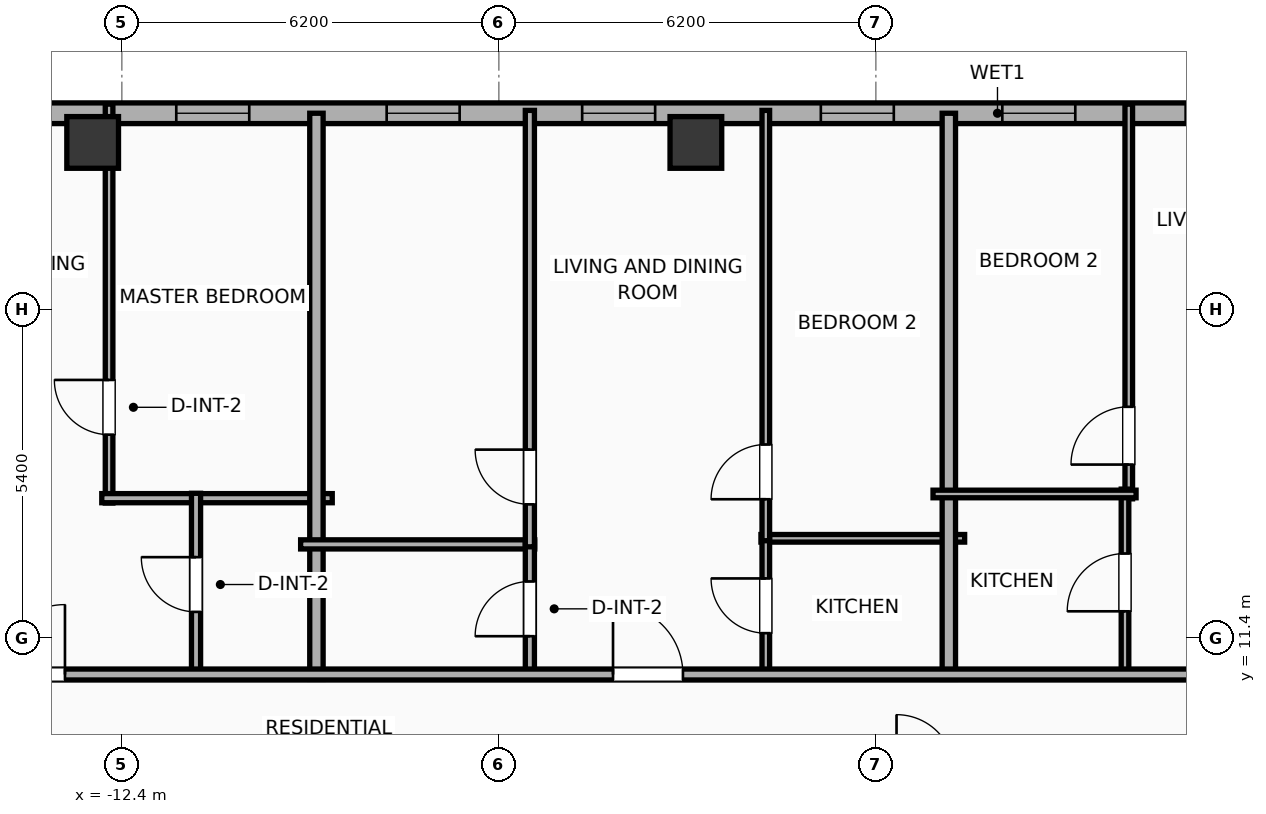
"""IFC4 building model, lengths in metres.
Left out: names, types, materials, properties, quantities, classifications, styles, units other than length and angle.
Written with IfcOpenShell. Run it as: python <this file> out.ifc"""

import sys

from ifc_helpers import new_model, si_unit, direction, frame, frame_2d, origin, origin_2d, place, context, subcontext, project, spatial, rectangle, hollow_rectangle, extrude, element, fill, save


model = new_model("IFC4")
c1 = context("Model", 3, precision=1e-05, world=origin(), true_north=direction((0.0, 1.0)))
c2 = subcontext(c1, "Body", "Model", "MODEL_VIEW")
j1 = project(units=[si_unit("LENGTHUNIT", "METRE"), si_unit("PLANEANGLEUNIT", "RADIAN")], contexts=[c1])
p1 = place(None, origin())
s1 = spatial("IfcSite", under=j1, at=p1, CompositionType="ELEMENT")
p2 = place(p1, origin())
s2 = spatial("IfcBuilding", under=s1, at=p2, CompositionType="ELEMENT")
p3 = place(p2, frame((0.0, 0.0, 223.6)))
s3 = spatial("IfcBuildingStorey", under=s2, at=p3, CompositionType="ELEMENT", Elevation=223.6)
for number, where, z_axis, x_axis in (
    (1, (-2.96, 19.55, 0.0), (0.0, 0.0, 1.0), (1.0, 0.0, 0.0)),
    (2, (-12.88, 19.55, 0.0), (0.0, 0.0, 1.0), (1.0, 0.0, 0.0)),
):
    element("IfcColumn", number, at=place(p3, frame(where, z_axis=z_axis, x_axis=x_axis)), inside=s3, PredefinedType="COLUMN", context=c2, shape_type="SweptSolid", body=[
        extrude(hollow_rectangle(XDim=0.85, YDim=0.85, WallThickness=0.028, at=origin_2d()), origin(), (0.0, 0.0, 1.0), 3.9),
    ])
p4 = place(p3, frame((-22.783, 20.03, 0.0), z_axis=(0.0, 0.0, 1.0), x_axis=(1.0, 0.0, 0.0)))
e3 = element("IfcWall", 3, at=p4, inside=s3, PredefinedType="ELEMENTEDWALL", context=c2, shape_type="SweptSolid", body=[
    extrude(rectangle(XDim=49.566, YDim=0.34, at=frame_2d((24.783, 0.0))), origin(), (0.0, 0.0, 1.0), 3.65),
])
p5 = place(p4, frame((40.956, 0.0, 0.75)))
e4 = element("IfcOpeningElement", 4, at=p5, cuts=e3, PredefinedType="OPENING", context=c2, shape_type="SweptSolid", body=[
    extrude(rectangle(XDim=2.4, YDim=2.1, at=frame_2d((1.2, 1.05))), frame((0.0, 0.18, 0.0), z_axis=(0.0, -1.0, 0.0), x_axis=(1.0, 0.0, 0.0)), (0.0, 0.0, 1.0), 0.36),
])
p6 = place(p4, frame((1.437, 0.0, 0.75)))
e5 = element("IfcOpeningElement", 5, at=p6, cuts=e3, PredefinedType="OPENING", context=c2, shape_type="SweptSolid", body=[
    extrude(rectangle(XDim=1.2, YDim=2.05, at=frame_2d((0.6, 1.025))), frame((0.0, 0.18, 0.0), z_axis=(0.0, -1.0, 0.0), x_axis=(1.0, 0.0, 0.0)), (0.0, 0.0, 1.0), 0.36),
])
p7 = place(p4, frame((7.619, 0.0, 0.75)))
e6 = element("IfcOpeningElement", 6, at=p7, cuts=e3, PredefinedType="OPENING", context=c2, shape_type="SweptSolid", body=[
    extrude(rectangle(XDim=1.2, YDim=2.05, at=frame_2d((0.6, 1.025))), frame((0.0, 0.18, 0.0), z_axis=(0.0, -1.0, 0.0), x_axis=(1.0, 0.0, 0.0)), (0.0, 0.0, 1.0), 0.36),
])
p8 = place(p4, frame((4.124, 0.0, 0.75)))
e7 = element("IfcOpeningElement", 7, at=p8, cuts=e3, PredefinedType="OPENING", context=c2, shape_type="SweptSolid", body=[
    extrude(rectangle(XDim=1.2, YDim=2.05, at=frame_2d((0.6, 1.025))), frame((0.0, 0.18, 0.0), z_axis=(0.0, -1.0, 0.0), x_axis=(1.0, 0.0, 0.0)), (0.0, 0.0, 1.0), 0.36),
])
p9 = place(p4, frame((11.278, 0.0, 0.75)))
e8 = element("IfcOpeningElement", 8, at=p9, cuts=e3, PredefinedType="OPENING", context=c2, shape_type="SweptSolid", body=[
    extrude(rectangle(XDim=1.2, YDim=2.05, at=frame_2d((0.6, 1.025))), frame((0.0, 0.18, 0.0), z_axis=(0.0, -1.0, 0.0), x_axis=(1.0, 0.0, 0.0)), (0.0, 0.0, 1.0), 0.36),
])
p10 = place(p4, frame((17.953, 0.0, 0.75)))
e9 = element("IfcOpeningElement", 9, at=p10, cuts=e3, PredefinedType="OPENING", context=c2, shape_type="SweptSolid", body=[
    extrude(rectangle(XDim=1.2, YDim=2.05, at=frame_2d((0.6, 1.025))), frame((0.0, 0.18, 0.0), z_axis=(0.0, -1.0, 0.0), x_axis=(1.0, 0.0, 0.0)), (0.0, 0.0, 1.0), 0.36),
])
p11 = place(p4, frame((14.738, 0.0, 0.75)))
e10 = element("IfcOpeningElement", 10, at=p11, cuts=e3, PredefinedType="OPENING", context=c2, shape_type="SweptSolid", body=[
    extrude(rectangle(XDim=1.2, YDim=2.05, at=frame_2d((0.6, 1.025))), frame((0.0, 0.18, 0.0), z_axis=(0.0, -1.0, 0.0), x_axis=(1.0, 0.0, 0.0)), (0.0, 0.0, 1.0), 0.36),
])
p12 = place(p4, frame((21.878, 0.0, 0.75)))
e11 = element("IfcOpeningElement", 11, at=p12, cuts=e3, PredefinedType="OPENING", context=c2, shape_type="SweptSolid", body=[
    extrude(rectangle(XDim=1.2, YDim=2.05, at=frame_2d((0.6, 1.025))), frame((0.0, 0.18, 0.0), z_axis=(0.0, -1.0, 0.0), x_axis=(1.0, 0.0, 0.0)), (0.0, 0.0, 1.0), 0.36),
])
p13 = place(p4, frame((27.878, 0.0, 0.75)))
e12 = element("IfcOpeningElement", 12, at=p13, cuts=e3, PredefinedType="OPENING", context=c2, shape_type="SweptSolid", body=[
    extrude(rectangle(XDim=1.2, YDim=2.05, at=frame_2d((0.6, 1.025))), frame((0.0, 0.18, 0.0), z_axis=(0.0, -1.0, 0.0), x_axis=(1.0, 0.0, 0.0)), (0.0, 0.0, 1.0), 0.36),
])
p14 = place(p4, frame((24.863, 0.0, 0.75)))
e13 = element("IfcOpeningElement", 13, at=p14, cuts=e3, PredefinedType="OPENING", context=c2, shape_type="SweptSolid", body=[
    extrude(rectangle(XDim=1.2, YDim=2.05, at=frame_2d((0.6, 1.025))), frame((0.0, 0.18, 0.0), z_axis=(0.0, -1.0, 0.0), x_axis=(1.0, 0.0, 0.0)), (0.0, 0.0, 1.0), 0.36),
])
p15 = place(p4, frame((32.078, 0.0, 0.75)))
e14 = element("IfcOpeningElement", 14, at=p15, cuts=e3, PredefinedType="OPENING", context=c2, shape_type="SweptSolid", body=[
    extrude(rectangle(XDim=1.2, YDim=2.05, at=frame_2d((0.6, 1.025))), frame((0.0, 0.18, 0.0), z_axis=(0.0, -1.0, 0.0), x_axis=(1.0, 0.0, 0.0)), (0.0, 0.0, 1.0), 0.36),
])
p16 = place(p4, frame((35.216, 0.0, 0.75)))
e15 = element("IfcOpeningElement", 15, at=p16, cuts=e3, PredefinedType="OPENING", context=c2, shape_type="SweptSolid", body=[
    extrude(rectangle(XDim=1.2, YDim=2.05, at=frame_2d((0.6, 1.025))), frame((0.0, 0.18, 0.0), z_axis=(0.0, -1.0, 0.0), x_axis=(1.0, 0.0, 0.0)), (0.0, 0.0, 1.0), 0.36),
])
p17 = place(p4, frame((45.73, 0.0, 0.75)))
e16 = element("IfcOpeningElement", 16, at=p17, cuts=e3, PredefinedType="OPENING", context=c2, shape_type="SweptSolid", body=[
    extrude(rectangle(XDim=1.2, YDim=2.05, at=frame_2d((0.6, 1.025))), frame((0.0, 0.18, 0.0), z_axis=(0.0, -1.0, 0.0), x_axis=(1.0, 0.0, 0.0)), (0.0, 0.0, 1.0), 0.36),
])
p18 = place(p3, frame((-12.61, 13.62, 0.0), z_axis=(0.0, 0.0, 1.0), x_axis=(0.0, 1.0, 0.0)))
e17 = element("IfcWall", 17, at=p18, inside=s3, PredefinedType="PARTITIONING", context=c2, shape_type="SweptSolid", body=[
    extrude(rectangle(XDim=6.56, YDim=0.125, at=frame_2d((3.28, 0.0))), origin(), (0.0, 0.0, 1.0), 3.09),
])
p19 = place(p18, frame((1.125, 0.0, 0.0)))
e18 = element("IfcOpeningElement", 18, at=p19, cuts=e17, PredefinedType="OPENING", context=c2, shape_type="SweptSolid", body=[
    extrude(rectangle(XDim=0.9, YDim=2.05, at=frame_2d((0.45, 1.025))), frame((0.0, 0.073, 0.0), z_axis=(0.0, -1.0, 0.0), x_axis=(1.0, 0.0, 0.0)), (0.0, 0.0, 1.0), 0.145),
])
p20 = place(p3, frame((-12.73, 13.7, 0.0), z_axis=(0.0, 0.0, 1.0), x_axis=(1.0, 0.0, 0.0)))
e19 = element("IfcWall", 19, at=p20, inside=s3, PredefinedType="PLUMBINGWALL", context=c2, shape_type="SweptSolid", body=[
    extrude(rectangle(XDim=3.79, YDim=0.15, at=frame_2d((1.895, 0.0))), origin(), (0.0, 0.0, 1.0), 3.65),
])
p21 = place(p3, frame((-11.18, 10.78, 0.0), z_axis=(0.0, 0.0, 1.0), x_axis=(0.0, 1.0, 0.0)))
e20 = element("IfcWall", 20, at=p21, inside=s3, PredefinedType="PLUMBINGWALL", context=c2, shape_type="SweptSolid", body=[
    extrude(rectangle(XDim=3.0, YDim=0.15, at=frame_2d((1.5, 0.0))), origin(), (0.0, 0.0, 1.0), 3.65),
])
p22 = place(p21, frame((1.05, 0.0, 0.0)))
e21 = element("IfcOpeningElement", 21, at=p22, cuts=e20, PredefinedType="OPENING", context=c2, shape_type="SweptSolid", body=[
    extrude(rectangle(XDim=0.9, YDim=2.05, at=frame_2d((0.45, 1.025))), frame((0.0, 0.085, 0.0), z_axis=(0.0, -1.0, 0.0), x_axis=(1.0, 0.0, 0.0)), (0.0, 0.0, 1.0), 0.17),
])
p23 = place(p3, frame((-9.2, 10.72, 0.0), z_axis=(0.0, 0.0, 1.0), x_axis=(0.0, 1.0, 0.0)))
e22 = element("IfcWall", 22, at=p23, inside=s3, PredefinedType="PARTITIONING", context=c2, shape_type="SweptSolid", body=[
    extrude(rectangle(XDim=9.31, YDim=0.22, at=frame_2d((4.655, 0.0))), origin(), (0.0, 0.0, 1.0), 3.65),
])
p24 = place(p3, frame((-9.46, 12.94, 0.0), z_axis=(0.0, 0.0, 1.0), x_axis=(1.0, 0.0, 0.0)))
e23 = element("IfcWall", 23, at=p24, inside=s3, PredefinedType="PLUMBINGWALL", context=c2, shape_type="SweptSolid", body=[
    extrude(rectangle(XDim=3.85, YDim=0.15, at=frame_2d((1.925, 0.0))), origin(), (0.0, 0.0, 1.0), 3.65),
])
p25 = place(p3, frame((-1.89, 13.04, 0.0), z_axis=(0.0, 0.0, 1.0), x_axis=(1.0, 0.0, 0.0)))
e24 = element("IfcWall", 24, at=p25, inside=s3, PredefinedType="PARTITIONING", context=c2, shape_type="SweptSolid", body=[
    extrude(rectangle(XDim=3.35, YDim=0.125, at=frame_2d((1.675, 0.0))), origin(), (0.0, 0.0, 1.0), 3.65),
])
p26 = place(p3, frame((-5.69, 10.78, 0.0), z_axis=(0.0, 0.0, 1.0), x_axis=(0.0, 1.0, 0.0)))
e25 = element("IfcWall", 25, at=p26, inside=s3, PredefinedType="PLUMBINGWALL", context=c2, shape_type="SweptSolid", body=[
    extrude(rectangle(XDim=2.2, YDim=0.15, at=frame_2d((1.1, 0.0))), origin(), (0.0, 0.0, 1.0), 3.65),
])
p27 = place(p26, frame((0.65, 0.0, 0.0)))
e26 = element("IfcOpeningElement", 26, at=p27, cuts=e25, PredefinedType="OPENING", context=c2, shape_type="SweptSolid", body=[
    extrude(rectangle(XDim=0.9, YDim=2.05, at=frame_2d((0.45, 1.025))), frame((0.0, 0.085, 0.0), z_axis=(0.0, -1.0, 0.0), x_axis=(1.0, 0.0, 0.0)), (0.0, 0.0, 1.0), 0.17),
])
p28 = place(p3, frame((-5.69, 12.9, 0.0), z_axis=(0.0, 0.0, 1.0), x_axis=(0.0, 1.0, 0.0)))
e27 = element("IfcWall", 27, at=p28, inside=s3, PredefinedType="PLUMBINGWALL", context=c2, shape_type="SweptSolid", body=[
    extrude(rectangle(XDim=7.177, YDim=0.15, at=frame_2d((3.588, 0.0))), origin(), (0.0, 0.0, 1.0), 3.65),
])
p29 = place(p28, frame((0.698, 0.0, 0.0)))
e28 = element("IfcOpeningElement", 28, at=p29, cuts=e27, PredefinedType="OPENING", context=c2, shape_type="SweptSolid", body=[
    extrude(rectangle(XDim=0.9, YDim=2.05, at=frame_2d((0.45, 1.025))), frame((0.0, 0.085, 0.0), z_axis=(0.0, -1.0, 0.0), x_axis=(1.0, 0.0, 0.0)), (0.0, 0.0, 1.0), 0.17),
])
p30 = place(p3, frame((-1.81, 10.78, 0.0), z_axis=(0.0, 0.0, 1.0), x_axis=(0.0, 1.0, 0.0)))
e29 = element("IfcWall", 29, at=p30, inside=s3, PredefinedType="PARTITIONING", context=c2, shape_type="SweptSolid", body=[
    extrude(rectangle(XDim=2.3, YDim=0.125, at=frame_2d((1.15, 0.0))), origin(), (0.0, 0.0, 1.0), 3.65),
])
p31 = place(p30, frame((0.7, 0.0, 0.0)))
e30 = element("IfcOpeningElement", 30, at=p31, cuts=e29, PredefinedType="OPENING", context=c2, shape_type="SweptSolid", body=[
    extrude(rectangle(XDim=0.9, YDim=2.05, at=frame_2d((0.45, 1.025))), frame((0.0, 0.073, 0.0), z_axis=(0.0, -1.0, 0.0), x_axis=(1.0, 0.0, 0.0)), (0.0, 0.0, 1.0), 0.145),
])
p32 = place(p3, frame((-1.81, 13.0, 0.0), z_axis=(0.0, 0.0, 1.0), x_axis=(0.0, 1.0, 0.0)))
e31 = element("IfcWall", 31, at=p32, inside=s3, PredefinedType="PARTITIONING", context=c2, shape_type="SweptSolid", body=[
    extrude(rectangle(XDim=7.077, YDim=0.125, at=frame_2d((3.539, 0.0))), origin(), (0.0, 0.0, 1.0), 3.65),
])
p33 = place(p32, frame((0.682, 0.0, 0.0)))
e32 = element("IfcOpeningElement", 32, at=p33, cuts=e31, PredefinedType="OPENING", context=c2, shape_type="SweptSolid", body=[
    extrude(rectangle(XDim=0.9, YDim=2.05, at=frame_2d((0.45, 1.025))), frame((0.0, 0.073, 0.0), z_axis=(0.0, -1.0, 0.0), x_axis=(1.0, 0.0, 0.0)), (0.0, 0.0, 1.0), 0.145),
])
p34 = place(p3, frame((1.2, 10.72, 0.0), z_axis=(0.0, 0.0, 1.0), x_axis=(0.0, 1.0, 0.0)))
e33 = element("IfcWall", 33, at=p34, inside=s3, PredefinedType="PARTITIONING", context=c2, shape_type="SweptSolid", body=[
    extrude(rectangle(XDim=9.31, YDim=0.22, at=frame_2d((4.655, 0.0))), origin(), (0.0, 0.0, 1.0), 3.65),
])
p35 = place(p3, frame((4.159, 13.689, 0.0), z_axis=(0.0, 0.0, 1.0), x_axis=(0.0, 1.0, 0.0)))
e34 = element("IfcWall", 34, at=p35, inside=s3, PredefinedType="PARTITIONING", context=c2, shape_type="SweptSolid", body=[
    extrude(rectangle(XDim=6.491, YDim=0.125, at=frame_2d((3.246, 0.0))), origin(), (0.0, 0.0, 1.0), 3.65),
])
p36 = place(p35, frame((0.564, 0.0, 0.0)))
e35 = element("IfcOpeningElement", 35, at=p36, cuts=e34, PredefinedType="OPENING", context=c2, shape_type="SweptSolid", body=[
    extrude(rectangle(XDim=0.95, YDim=2.05, at=frame_2d((0.475, 1.025))), frame((0.0, 0.073, 0.0), z_axis=(0.0, -1.0, 0.0), x_axis=(1.0, 0.0, 0.0)), (0.0, 0.0, 1.0), 0.145),
])
p37 = place(p3, frame((4.097, 10.78, 0.0), z_axis=(0.0, 0.0, 1.0), x_axis=(0.0, 1.0, 0.0)))
e36 = element("IfcWall", 36, at=p37, inside=s3, PredefinedType="PARTITIONING", context=c2, shape_type="SweptSolid", body=[
    extrude(rectangle(XDim=3.069, YDim=0.125, at=frame_2d((1.535, 0.0))), origin(), (0.0, 0.0, 1.0), 3.65),
])
p38 = place(p37, frame((1.06, 0.0, 0.0)))
e37 = element("IfcOpeningElement", 37, at=p38, cuts=e36, PredefinedType="OPENING", context=c2, shape_type="SweptSolid", body=[
    extrude(rectangle(XDim=0.95, YDim=2.05, at=frame_2d((0.475, 1.025))), frame((0.0, 0.073, 0.0), z_axis=(0.0, -1.0, 0.0), x_axis=(1.0, 0.0, 0.0)), (0.0, 0.0, 1.0), 0.145),
])
p39 = place(p3, frame((0.94, 13.769, 0.0), z_axis=(0.0, 0.0, 1.0), x_axis=(1.0, 0.0, 0.0)))
e38 = element("IfcWall", 38, at=p39, inside=s3, PredefinedType="PARTITIONING", context=c2, shape_type="SweptSolid", body=[
    extrude(rectangle(XDim=3.339, YDim=0.125, at=frame_2d((1.669, 0.0))), origin(), (0.0, 0.0, 1.0), 3.65),
])
p40 = place(p3, frame((-26.23, 10.8, 0.0), z_axis=(0.0, 0.0, 1.0), x_axis=(1.0, 0.0, 0.0)))
e39 = element("IfcWall", 39, at=p40, inside=s3, PredefinedType="PARTITIONING", context=c2, shape_type="SweptSolid", body=[
    extrude(rectangle(XDim=56.46, YDim=0.18, at=frame_2d((28.23, 0.0))), origin(), (0.0, 0.0, 1.0), 3.65),
])
p41 = place(p40, frame((2.994, 0.0, 0.0)))
e40 = element("IfcOpeningElement", 40, at=p41, cuts=e39, PredefinedType="OPENING", context=c2, shape_type="SweptSolid", body=[
    extrude(rectangle(XDim=0.9, YDim=2.05, at=frame_2d((0.45, 1.025))), frame((0.0, 0.1, 0.0), z_axis=(0.0, -1.0, 0.0), x_axis=(1.0, 0.0, 0.0)), (0.0, 0.0, 1.0), 0.2),
])
p42 = place(p40, frame((11.745, 0.0, 0.0)))
e41 = element("IfcOpeningElement", 41, at=p42, cuts=e39, PredefinedType="OPENING", context=c2, shape_type="SweptSolid", body=[
    extrude(rectangle(XDim=1.15, YDim=2.05, at=frame_2d((0.575, 1.025))), frame((0.0, 0.1, 0.0), z_axis=(0.0, -1.0, 0.0), x_axis=(1.0, 0.0, 0.0)), (0.0, 0.0, 1.0), 0.2),
])
p43 = place(p40, frame((21.907, 0.0, 0.0)))
e42 = element("IfcOpeningElement", 42, at=p43, cuts=e39, PredefinedType="OPENING", context=c2, shape_type="SweptSolid", body=[
    extrude(rectangle(XDim=1.15, YDim=2.05, at=frame_2d((0.575, 1.025))), frame((0.0, 0.1, 0.0), z_axis=(0.0, -1.0, 0.0), x_axis=(1.0, 0.0, 0.0)), (0.0, 0.0, 1.0), 0.2),
])
p44 = place(p40, frame((32.516, 0.0, 0.0)))
e43 = element("IfcOpeningElement", 43, at=p44, cuts=e39, PredefinedType="OPENING", context=c2, shape_type="SweptSolid", body=[
    extrude(rectangle(XDim=1.15, YDim=2.05, at=frame_2d((0.575, 1.025))), frame((0.0, 0.1, 0.0), z_axis=(0.0, -1.0, 0.0), x_axis=(1.0, 0.0, 0.0)), (0.0, 0.0, 1.0), 0.2),
])
p45 = place(p40, frame((41.956, 0.0, 0.0)))
e44 = element("IfcOpeningElement", 44, at=p45, cuts=e39, PredefinedType="OPENING", context=c2, shape_type="SweptSolid", body=[
    extrude(rectangle(XDim=1.15, YDim=2.05, at=frame_2d((0.575, 1.025))), frame((0.0, 0.1, 0.0), z_axis=(0.0, -1.0, 0.0), x_axis=(1.0, 0.0, 0.0)), (0.0, 0.0, 1.0), 0.2),
])
p46 = place(p40, frame((51.656, 0.0, 0.0)))
e45 = element("IfcOpeningElement", 45, at=p46, cuts=e39, PredefinedType="OPENING", context=c2, shape_type="SweptSolid", body=[
    extrude(rectangle(XDim=1.15, YDim=2.05, at=frame_2d((0.575, 1.025))), frame((0.0, 0.1, 0.0), z_axis=(0.0, -1.0, 0.0), x_axis=(1.0, 0.0, 0.0)), (0.0, 0.0, 1.0), 0.2),
])
p47 = place(p9, origin())
e46 = element("IfcWindow", 46, at=p47, inside=s3, PartitioningType="SINGLE_PANEL", PredefinedType="WINDOW", context=c2, shape_type="SweptSolid", body=[
    extrude(rectangle(XDim=1.2, YDim=2.05, at=frame_2d((0.6, 1.025))), frame((0.0, 0.03, 0.0), z_axis=(0.0, -1.0, 0.0), x_axis=(1.0, 0.0, 0.0)), (0.0, 0.0, 1.0), 0.06),
])
fill(e8, e46)
p48 = place(p10, origin())
e47 = element("IfcWindow", 47, at=p48, inside=s3, PartitioningType="SINGLE_PANEL", PredefinedType="WINDOW", context=c2, shape_type="SweptSolid", body=[
    extrude(rectangle(XDim=1.2, YDim=2.05, at=frame_2d((0.6, 1.025))), frame((0.0, 0.03, 0.0), z_axis=(0.0, -1.0, 0.0), x_axis=(1.0, 0.0, 0.0)), (0.0, 0.0, 1.0), 0.06),
])
fill(e9, e47)
p49 = place(p11, origin())
e48 = element("IfcWindow", 48, at=p49, inside=s3, PartitioningType="SINGLE_PANEL", PredefinedType="WINDOW", context=c2, shape_type="SweptSolid", body=[
    extrude(rectangle(XDim=1.2, YDim=2.05, at=frame_2d((0.6, 1.025))), frame((0.0, 0.03, 0.0), z_axis=(0.0, -1.0, 0.0), x_axis=(1.0, 0.0, 0.0)), (0.0, 0.0, 1.0), 0.06),
])
fill(e10, e48)
p50 = place(p12, origin())
e49 = element("IfcWindow", 49, at=p50, inside=s3, PartitioningType="SINGLE_PANEL", PredefinedType="WINDOW", context=c2, shape_type="SweptSolid", body=[
    extrude(rectangle(XDim=1.2, YDim=2.05, at=frame_2d((0.6, 1.025))), frame((0.0, 0.03, 0.0), z_axis=(0.0, -1.0, 0.0), x_axis=(1.0, 0.0, 0.0)), (0.0, 0.0, 1.0), 0.06),
])
fill(e11, e49)
p51 = place(p13, origin())
e50 = element("IfcWindow", 50, at=p51, inside=s3, PartitioningType="SINGLE_PANEL", PredefinedType="WINDOW", context=c2, shape_type="SweptSolid", body=[
    extrude(rectangle(XDim=1.2, YDim=2.05, at=frame_2d((0.6, 1.025))), frame((0.0, 0.03, 0.0), z_axis=(0.0, -1.0, 0.0), x_axis=(1.0, 0.0, 0.0)), (0.0, 0.0, 1.0), 0.06),
])
fill(e12, e50)
p52 = place(p14, origin())
e51 = element("IfcWindow", 51, at=p52, inside=s3, PartitioningType="SINGLE_PANEL", PredefinedType="WINDOW", context=c2, shape_type="SweptSolid", body=[
    extrude(rectangle(XDim=1.2, YDim=2.05, at=frame_2d((0.6, 1.025))), frame((0.0, 0.03, 0.0), z_axis=(0.0, -1.0, 0.0), x_axis=(1.0, 0.0, 0.0)), (0.0, 0.0, 1.0), 0.06),
])
fill(e13, e51)
p53 = place(p19, origin())
e52 = element("IfcDoor", 52, at=p53, inside=s3, OperationType="SINGLE_SWING_RIGHT", PredefinedType="DOOR", context=c2, shape_type="SweptSolid", body=[
    extrude(rectangle(XDim=0.9, YDim=2.05, at=frame_2d((0.45, 1.025))), frame((0.0, 0.025, 0.0), z_axis=(0.0, -1.0, 0.0), x_axis=(1.0, 0.0, 0.0)), (0.0, 0.0, 1.0), 0.05),
])
fill(e18, e52)
p54 = place(p22, origin())
e53 = element("IfcDoor", 53, at=p54, inside=s3, OperationType="SINGLE_SWING_RIGHT", PredefinedType="DOOR", context=c2, shape_type="SweptSolid", body=[
    extrude(rectangle(XDim=0.9, YDim=2.05, at=frame_2d((0.45, 1.025))), frame((0.0, 0.025, 0.0), z_axis=(0.0, -1.0, 0.0), x_axis=(1.0, 0.0, 0.0)), (0.0, 0.0, 1.0), 0.05),
])
fill(e21, e53)
p55 = place(p27, origin())
e54 = element("IfcDoor", 54, at=p55, inside=s3, OperationType="SINGLE_SWING_LEFT", PredefinedType="DOOR", context=c2, shape_type="SweptSolid", body=[
    extrude(rectangle(XDim=0.9, YDim=2.05, at=frame_2d((0.45, 1.025))), frame((0.0, 0.025, 0.0), z_axis=(0.0, -1.0, 0.0), x_axis=(1.0, 0.0, 0.0)), (0.0, 0.0, 1.0), 0.05),
])
fill(e26, e54)
p56 = place(p29, origin())
e55 = element("IfcDoor", 55, at=p56, inside=s3, OperationType="SINGLE_SWING_RIGHT", PredefinedType="DOOR", context=c2, shape_type="SweptSolid", body=[
    extrude(rectangle(XDim=0.9, YDim=2.05, at=frame_2d((0.45, 1.025))), frame((0.0, 0.025, 0.0), z_axis=(0.0, -1.0, 0.0), x_axis=(1.0, 0.0, 0.0)), (0.0, 0.0, 1.0), 0.05),
])
fill(e28, e55)
p57 = place(p31, origin())
e56 = element("IfcDoor", 56, at=p57, inside=s3, OperationType="SINGLE_SWING_RIGHT", PredefinedType="DOOR", context=c2, shape_type="SweptSolid", body=[
    extrude(rectangle(XDim=0.9, YDim=2.05, at=frame_2d((0.45, 1.025))), frame((0.0, 0.025, 0.0), z_axis=(0.0, -1.0, 0.0), x_axis=(1.0, 0.0, 0.0)), (0.0, 0.0, 1.0), 0.05),
])
fill(e30, e56)
p58 = place(p33, origin())
e57 = element("IfcDoor", 57, at=p58, inside=s3, OperationType="SINGLE_SWING_LEFT", PredefinedType="DOOR", context=c2, shape_type="SweptSolid", body=[
    extrude(rectangle(XDim=0.9, YDim=2.05, at=frame_2d((0.45, 1.025))), frame((0.0, 0.025, 0.0), z_axis=(0.0, -1.0, 0.0), x_axis=(1.0, 0.0, 0.0)), (0.0, 0.0, 1.0), 0.05),
])
fill(e32, e57)
p59 = place(p36, origin())
e58 = element("IfcDoor", 58, at=p59, inside=s3, OperationType="SINGLE_SWING_LEFT", PredefinedType="DOOR", context=c2, shape_type="SweptSolid", body=[
    extrude(rectangle(XDim=0.95, YDim=2.05, at=frame_2d((0.475, 1.025))), frame((0.0, 0.025, 0.0), z_axis=(0.0, -1.0, 0.0), x_axis=(1.0, 0.0, 0.0)), (0.0, 0.0, 1.0), 0.05),
])
fill(e35, e58)
p60 = place(p38, origin())
e59 = element("IfcDoor", 59, at=p60, inside=s3, OperationType="SINGLE_SWING_LEFT", PredefinedType="DOOR", context=c2, shape_type="SweptSolid", body=[
    extrude(rectangle(XDim=0.95, YDim=2.05, at=frame_2d((0.475, 1.025))), frame((0.0, 0.025, 0.0), z_axis=(0.0, -1.0, 0.0), x_axis=(1.0, 0.0, 0.0)), (0.0, 0.0, 1.0), 0.05),
])
fill(e37, e59)
p61 = place(p42, origin())
e60 = element("IfcDoor", 60, at=p61, inside=s3, OperationType="SINGLE_SWING_RIGHT", PredefinedType="DOOR", context=c2, shape_type="SweptSolid", body=[
    extrude(rectangle(XDim=1.15, YDim=2.05, at=frame_2d((0.575, 1.025))), frame((0.0, 0.025, 0.0), z_axis=(0.0, -1.0, 0.0), x_axis=(1.0, 0.0, 0.0)), (0.0, 0.0, 1.0), 0.05),
])
fill(e41, e60)
p62 = place(p43, origin())
e61 = element("IfcDoor", 61, at=p62, inside=s3, OperationType="SINGLE_SWING_LEFT", PredefinedType="DOOR", context=c2, shape_type="SweptSolid", body=[
    extrude(rectangle(XDim=1.15, YDim=2.05, at=frame_2d((0.575, 1.025))), frame((0.0, 0.025, 0.0), z_axis=(0.0, -1.0, 0.0), x_axis=(1.0, 0.0, 0.0)), (0.0, 0.0, 1.0), 0.05),
])
fill(e42, e61)
save(model, sys.argv[1])
